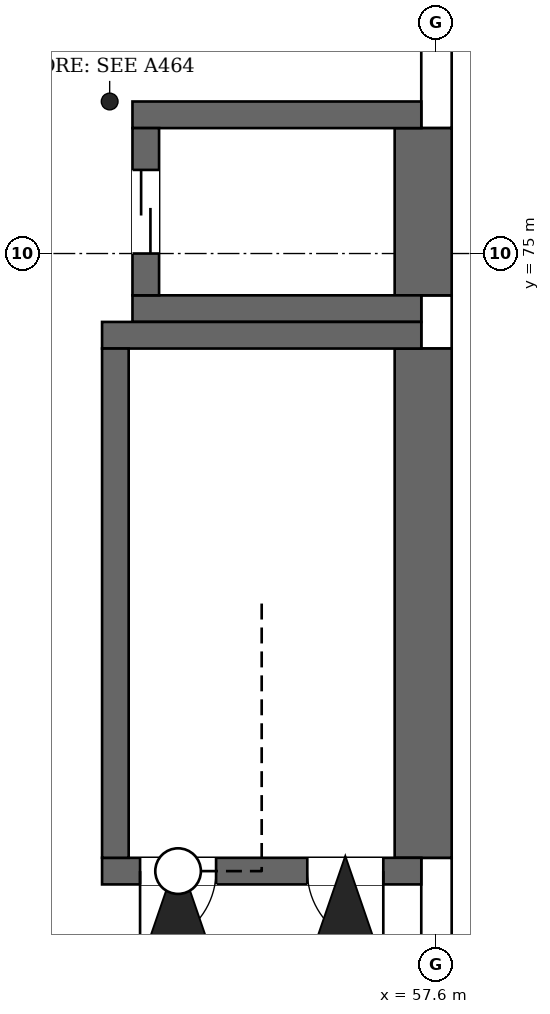
"""IFC4 building model, lengths in metres.
Left out: names, types, materials, properties, quantities, classifications, styles, units other than length and angle.
Written with IfcOpenShell. Run it as: python <this file> out.ifc"""

import sys

from ifc_helpers import new_model, si_unit, direction, frame, frame_2d, origin, place, context, subcontext, project, spatial, rectangle, extrude, element, fill, save


model = new_model("IFC4")
c1 = context("Model", 3, precision=1e-05, world=origin(), true_north=direction((0.0, 1.0)))
c2 = subcontext(c1, "Body", "Model", "MODEL_VIEW")
j1 = project(units=[si_unit("LENGTHUNIT", "METRE"), si_unit("PLANEANGLEUNIT", "RADIAN")], contexts=[c1])
p1 = place(None, origin())
s1 = spatial("IfcSite", under=j1, at=p1, CompositionType="ELEMENT")
p2 = place(p1, origin())
s2 = spatial("IfcBuilding", under=s1, at=p2, CompositionType="ELEMENT")
p3 = place(p2, frame((0.0, 0.0, 31.9)))
s3 = spatial("IfcBuildingStorey", under=s2, at=p3, CompositionType="ELEMENT", Elevation=31.9)
p4 = place(p3, frame((53.2, 66.875, 0.0), z_axis=(0.0, 0.0, 1.0), x_axis=(1.0, 0.0, 0.0)))
e1 = element("IfcWall", 1, at=p4, inside=s3, PredefinedType="SHEAR", context=c2, shape_type="SweptSolid", body=[
    extrude(rectangle(XDim=4.2, YDim=0.35, at=frame_2d((2.1, 0.0))), origin(), (0.0, 0.0, 1.0), 3.2),
])
p5 = place(p4, frame((0.5, 0.0, 0.0)))
e2 = element("IfcOpeningElement", 2, at=p5, cuts=e1, PredefinedType="OPENING", context=c2, shape_type="SweptSolid", body=[
    extrude(rectangle(XDim=1.0, YDim=2.1, at=frame_2d((0.5, 1.05))), frame((0.0, 0.185, 0.0), z_axis=(0.0, -1.0, 0.0), x_axis=(1.0, 0.0, 0.0)), (0.0, 0.0, 1.0), 0.37),
])
p6 = place(p4, frame((2.7, 0.0, 0.0)))
e3 = element("IfcOpeningElement", 3, at=p6, cuts=e1, PredefinedType="OPENING", context=c2, shape_type="SweptSolid", body=[
    extrude(rectangle(XDim=1.0, YDim=2.1, at=frame_2d((0.5, 1.05))), frame((0.0, 0.185, 0.0), z_axis=(0.0, -1.0, 0.0), x_axis=(1.0, 0.0, 0.0)), (0.0, 0.0, 1.0), 0.37),
])
p7 = place(p3, frame((53.2, 73.925, 0.0), z_axis=(0.0, 0.0, 1.0), x_axis=(1.0, 0.0, 0.0)))
e4 = element("IfcWall", 4, at=p7, inside=s3, PredefinedType="SHEAR", context=c2, shape_type="SweptSolid", body=[
    extrude(rectangle(XDim=4.2, YDim=0.35, at=frame_2d((2.1, 0.0))), origin(), (0.0, 0.0, 1.0), 3.2),
])
p8 = place(p3, frame((53.375, 67.05, 0.0), z_axis=(0.0, 0.0, 1.0), x_axis=(0.0, 1.0, 0.0)))
e5 = element("IfcWall", 5, at=p8, inside=s3, PredefinedType="SHEAR", context=c2, shape_type="SweptSolid", body=[
    extrude(rectangle(XDim=6.7, YDim=0.35, at=frame_2d((3.35, 0.0))), origin(), (0.0, 0.0, 1.0), 3.2),
])
p9 = place(p3, frame((57.425, 67.05, 0.0), z_axis=(0.0, 0.0, 1.0), x_axis=(0.0, 1.0, 0.0)))
e6 = element("IfcWall", 6, at=p9, inside=s3, PredefinedType="SHEAR", context=c2, shape_type="SweptSolid", body=[
    extrude(rectangle(XDim=6.7, YDim=0.75, at=frame_2d((3.35, 0.0))), origin(), (0.0, 0.0, 1.0), 3.2),
])
for number, where, z_axis, x_axis in (
    (7, (53.6, 74.275, 0.0), (0.0, 0.0, 1.0), (1.0, 0.0, 0.0)),
    (8, (53.6, 76.825, 0.0), (0.0, 0.0, 1.0), (1.0, 0.0, 0.0)),
):
    element("IfcWall", number, at=place(p3, frame(where, z_axis=z_axis, x_axis=x_axis)), inside=s3, PredefinedType="SHEAR", context=c2, shape_type="SweptSolid", body=[
        extrude(rectangle(XDim=3.8, YDim=0.35, at=frame_2d((1.9, 0.0))), origin(), (0.0, 0.0, 1.0), 4.2),
    ])
p10 = place(p3, frame((53.775, 74.45, 0.0), z_axis=(0.0, 0.0, 1.0), x_axis=(0.0, 1.0, 0.0)))
e9 = element("IfcWall", 9, at=p10, inside=s3, PredefinedType="SHEAR", context=c2, shape_type="SweptSolid", body=[
    extrude(rectangle(XDim=2.2, YDim=0.35, at=frame_2d((1.1, 0.0))), origin(), (0.0, 0.0, 1.0), 4.2),
])
p11 = place(p10, frame((0.55, 0.0, 0.0)))
e10 = element("IfcOpeningElement", 10, at=p11, cuts=e9, PredefinedType="OPENING", context=c2, shape_type="SweptSolid", body=[
    extrude(rectangle(XDim=1.1, YDim=2.1, at=frame_2d((0.55, 1.05))), frame((0.0, 0.185, 0.0), z_axis=(0.0, -1.0, 0.0), x_axis=(1.0, 0.0, 0.0)), (0.0, 0.0, 1.0), 0.37),
])
p12 = place(p3, frame((57.425, 74.45, 0.0), z_axis=(0.0, 0.0, 1.0), x_axis=(0.0, 1.0, 0.0)))
e11 = element("IfcWall", 11, at=p12, inside=s3, PredefinedType="SHEAR", context=c2, shape_type="SweptSolid", body=[
    extrude(rectangle(XDim=2.2, YDim=0.75, at=frame_2d((1.1, 0.0))), origin(), (0.0, 0.0, 1.0), 4.2),
])
p13 = place(p3, frame((57.6, 62.65, 0.0), z_axis=(0.0, 0.0, 1.0), x_axis=(0.0, 1.0, 0.0)))
e12 = element("IfcWall", 12, at=p13, inside=s3, PredefinedType="PARAPET", context=c2, shape_type="SweptSolid", body=[
    extrude(rectangle(XDim=4.4, YDim=0.4, at=frame_2d((2.2, 0.0))), origin(), (0.0, 0.0, 1.0), 1.1),
])
p14 = place(p3, frame((57.6, 73.75, 0.0), z_axis=(0.0, 0.0, 1.0), x_axis=(0.0, 1.0, 0.0)))
e13 = element("IfcWall", 13, at=p14, inside=s3, PredefinedType="PARAPET", context=c2, shape_type="SweptSolid", body=[
    extrude(rectangle(XDim=0.7, YDim=0.4, at=frame_2d((0.35, 0.0))), origin(), (0.0, 0.0, 1.0), 1.1),
])
p15 = place(p3, frame((57.6, 76.65, 0.0), z_axis=(0.0, 0.0, 1.0), x_axis=(0.0, 1.0, 0.0)))
e14 = element("IfcWall", 14, at=p15, inside=s3, PredefinedType="PARAPET", context=c2, shape_type="SweptSolid", body=[
    extrude(rectangle(XDim=17.43, YDim=0.4, at=frame_2d((8.715, 0.0))), origin(), (0.0, 0.0, 1.0), 1.1),
])
p16 = place(p5, frame((1.0, 0.0, 0.0), z_axis=(0.0, 0.0, 1.0), x_axis=(-1.0, 0.0, 0.0)))
e15 = element("IfcDoor", 15, at=p16, inside=s3, OperationType="SINGLE_SWING_LEFT", PredefinedType="DOOR", context=c2, shape_type="SweptSolid", body=[
    extrude(rectangle(XDim=1.0, YDim=2.1, at=frame_2d((0.5, 1.05))), frame((0.0, 0.025, 0.0), z_axis=(0.0, -1.0, 0.0), x_axis=(1.0, 0.0, 0.0)), (0.0, 0.0, 1.0), 0.05),
])
fill(e2, e15)
p17 = place(p6, frame((1.0, 0.0, 0.0), z_axis=(0.0, 0.0, 1.0), x_axis=(-1.0, 0.0, 0.0)))
e16 = element("IfcDoor", 16, at=p17, inside=s3, OperationType="SINGLE_SWING_RIGHT", PredefinedType="DOOR", context=c2, shape_type="SweptSolid", body=[
    extrude(rectangle(XDim=1.0, YDim=2.1, at=frame_2d((0.5, 1.05))), frame((0.0, 0.025, 0.0), z_axis=(0.0, -1.0, 0.0), x_axis=(1.0, 0.0, 0.0)), (0.0, 0.0, 1.0), 0.05),
])
fill(e3, e16)
p18 = place(p11, origin())
e17 = element("IfcDoor", 17, at=p18, inside=s3, OperationType="DOUBLE_DOOR_SLIDING", PredefinedType="DOOR", context=c2, shape_type="SweptSolid", body=[
    extrude(rectangle(XDim=1.1, YDim=2.1, at=frame_2d((0.55, 1.05))), frame((0.0, 0.025, 0.0), z_axis=(0.0, -1.0, 0.0), x_axis=(1.0, 0.0, 0.0)), (0.0, 0.0, 1.0), 0.05),
])
fill(e10, e17)
save(model, sys.argv[1])
